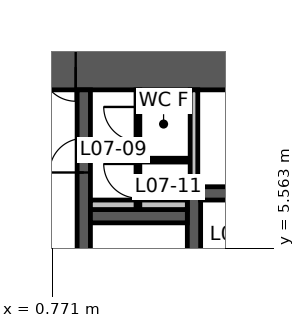
"""IFC4 building model, lengths in metres.
Left out: names, types, materials, properties, quantities, classifications, styles, units other than length and angle.
Written with IfcOpenShell. Run it as: python <this file> out.ifc"""

import sys

from ifc_helpers import new_model, si_unit, direction, frame, frame_2d, origin, place, context, subcontext, project, spatial, polyline, rectangle, outline, extrude, element, fill, save


model = new_model("IFC4")
c1 = context("Model", 3, precision=1e-05, world=origin(), true_north=direction((0.0, 1.0)))
c2 = subcontext(c1, "Body", "Model", "MODEL_VIEW")
j1 = project(units=[si_unit("LENGTHUNIT", "METRE"), si_unit("PLANEANGLEUNIT", "RADIAN")], contexts=[c1])
p1 = place(None, origin())
s1 = spatial("IfcSite", under=j1, at=p1, CompositionType="ELEMENT")
p2 = place(p1, origin())
s2 = spatial("IfcBuilding", under=s1, at=p2, CompositionType="ELEMENT")
p3 = place(p2, frame((0.0, 0.0, 26.8)))
s3 = spatial("IfcBuildingStorey", under=s2, at=p3, CompositionType="ELEMENT", Elevation=26.8)
p4 = place(p3, frame((5.961, 10.325, 0.0), z_axis=(0.0, 0.0, 1.0), x_axis=(-1.0, 0.0, 0.0)))
e1 = element("IfcWall", 1, at=p4, inside=s3, PredefinedType="SHEAR", context=c2, shape_type="SweptSolid", body=[
    extrude(outline(polyline([(-0.346, -0.6), (4.574, -0.6), (5.474, -0.6), (6.449, -0.6), (7.349, -0.6), (12.269, -0.6), (11.576, 0.6), (7.349, 0.6), (6.449, 0.6), (5.474, 0.6), (4.574, 0.6), (0.346, 0.6), (-0.346, -0.6)])), origin(), (0.0, 0.0, 1.0), 4.2),
])
p5 = place(p4, frame((6.449, 0.0, 0.0)))
e2 = element("IfcOpeningElement", 2, at=p5, cuts=e1, PredefinedType="OPENING", context=c2, shape_type="SweptSolid", body=[
    extrude(rectangle(XDim=0.9, YDim=2.1, at=frame_2d((0.45, 1.05))), frame((0.0, 0.61, 0.0), z_axis=(0.0, -1.0, 0.0), x_axis=(1.0, 0.0, 0.0)), (0.0, 0.0, 1.0), 1.22),
])
p6 = place(p4, frame((4.574, 0.0, 0.0)))
e3 = element("IfcOpeningElement", 3, at=p6, cuts=e1, PredefinedType="OPENING", context=c2, shape_type="SweptSolid", body=[
    extrude(rectangle(XDim=0.9, YDim=2.1, at=frame_2d((0.45, 1.05))), frame((0.0, 0.61, 0.0), z_axis=(0.0, -1.0, 0.0), x_axis=(1.0, 0.0, 0.0)), (0.0, 0.0, 1.0), 1.22),
])
p7 = place(p3, frame((1.6, 3.775, 0.0), z_axis=(0.0, 0.0, 1.0), x_axis=(0.0, 1.0, 0.0)))
e4 = element("IfcWall", 4, at=p7, inside=s3, PredefinedType="SHEAR", context=c2, shape_type="SweptSolid", body=[
    extrude(rectangle(XDim=5.95, YDim=0.35, at=frame_2d((2.975, 0.0))), origin(), (0.0, 0.0, 1.0), 4.2),
])
p8 = place(p7, frame((3.775, 0.0, 0.0)))
e5 = element("IfcOpeningElement", 5, at=p8, cuts=e4, PredefinedType="OPENING", context=c2, shape_type="SweptSolid", body=[
    extrude(rectangle(XDim=0.9, YDim=2.1, at=frame_2d((0.45, 1.05))), frame((0.0, 0.185, 0.0), z_axis=(0.0, -1.0, 0.0), x_axis=(1.0, 0.0, 0.0)), (0.0, 0.0, 1.0), 0.37),
])
p9 = place(p3, frame((4.5, 3.775, 0.0), z_axis=(0.0, 0.0, 1.0), x_axis=(0.0, 1.0, 0.0)))
e6 = element("IfcWall", 6, at=p9, inside=s3, PredefinedType="SHEAR", context=c2, shape_type="SweptSolid", body=[
    extrude(rectangle(XDim=3.4, YDim=0.35, at=frame_2d((1.7, 0.0))), origin(), (0.0, 0.0, 1.0), 4.2),
])
p10 = place(p3, frame((1.775, 6.4, 0.0), z_axis=(0.0, 0.0, 1.0), x_axis=(1.0, 0.0, 0.0)))
e7 = element("IfcWall", 7, at=p10, inside=s3, PredefinedType="SHEAR", context=c2, shape_type="SweptSolid", body=[
    extrude(rectangle(XDim=2.55, YDim=0.35, at=frame_2d((1.275, 0.0))), origin(), (0.0, 0.0, 1.0), 4.2),
])
p11 = place(p3, frame((4.675, 7.0, 0.0), z_axis=(0.0, 0.0, 1.0), x_axis=(1.0, 0.0, 0.0)))
e8 = element("IfcWall", 8, at=p11, inside=s3, PredefinedType="SHEAR", context=c2, shape_type="SweptSolid", body=[
    extrude(rectangle(XDim=2.25, YDim=0.35, at=frame_2d((1.125, 0.0))), origin(), (0.0, 0.0, 1.0), 4.2),
])
p12 = place(p3, frame((4.5, 7.175, 0.0), z_axis=(0.0, 0.0, 1.0), x_axis=(0.0, 1.0, 0.0)))
e9 = element("IfcWall", 9, at=p12, inside=s3, PredefinedType="STANDARD", context=c2, shape_type="SweptSolid", body=[
    extrude(rectangle(XDim=2.55, YDim=0.2, at=frame_2d((1.275, 0.0))), origin(), (0.0, 0.0, 1.0), 4.2),
])
p13 = place(p3, frame((1.775, 6.7, 0.0), z_axis=(0.0, 0.0, 1.0), x_axis=(1.0, 0.0, 0.0)))
e10 = element("IfcWall", 10, at=p13, inside=s3, PredefinedType="PLUMBINGWALL", context=c2, shape_type="SweptSolid", body=[
    extrude(rectangle(XDim=2.55, YDim=0.25, at=frame_2d((1.275, 0.0))), origin(), (0.0, 0.0, 1.0), 4.2),
])
p14 = place(p3, frame((3.025, 6.575, 0.0), z_axis=(0.0, 0.0, 1.0), x_axis=(0.0, 1.0, 0.0)))
e11 = element("IfcWall", 11, at=p14, inside=s3, PredefinedType="PARTITIONING", context=c2, shape_type="SweptSolid", body=[
    extrude(rectangle(XDim=3.15, YDim=0.1, at=frame_2d((1.575, 0.0))), origin(), (0.0, 0.0, 1.0), 3.23),
])
p15 = place(p14, frame((1.8, 0.0, 0.0)))
e12 = element("IfcOpeningElement", 12, at=p15, cuts=e11, PredefinedType="OPENING", context=c2, shape_type="SweptSolid", body=[
    extrude(rectangle(XDim=0.9, YDim=2.1, at=frame_2d((0.45, 1.05))), frame((0.0, 0.06, 0.0), z_axis=(0.0, -1.0, 0.0), x_axis=(1.0, 0.0, 0.0)), (0.0, 0.0, 1.0), 0.12),
])
p16 = place(p14, frame((0.3, 0.0, 0.0)))
e13 = element("IfcOpeningElement", 13, at=p16, cuts=e11, PredefinedType="OPENING", context=c2, shape_type="SweptSolid", body=[
    extrude(rectangle(XDim=0.9, YDim=2.1, at=frame_2d((0.45, 1.05))), frame((0.0, 0.06, 0.0), z_axis=(0.0, -1.0, 0.0), x_axis=(1.0, 0.0, 0.0)), (0.0, 0.0, 1.0), 0.12),
])
p17 = place(p3, frame((3.075, 7.875, 0.0), z_axis=(0.0, 0.0, 1.0), x_axis=(1.0, 0.0, 0.0)))
e14 = element("IfcWall", 14, at=p17, inside=s3, PredefinedType="PARTITIONING", context=c2, shape_type="SweptSolid", body=[
    extrude(rectangle(XDim=1.25, YDim=0.1, at=frame_2d((0.625, 0.0))), origin(), (0.0, 0.0, 1.0), 3.23),
])
p18 = place(p6, origin())
e15 = element("IfcDoor", 15, at=p18, inside=s3, OperationType="SINGLE_SWING_LEFT", PredefinedType="DOOR", context=c2, shape_type="SweptSolid", body=[
    extrude(rectangle(XDim=0.9, YDim=2.1, at=frame_2d((0.45, 1.05))), frame((0.0, 0.025, 0.0), z_axis=(0.0, -1.0, 0.0), x_axis=(1.0, 0.0, 0.0)), (0.0, 0.0, 1.0), 0.05),
])
fill(e3, e15)
p19 = place(p8, origin())
e16 = element("IfcDoor", 16, at=p19, inside=s3, OperationType="SINGLE_SWING_LEFT", PredefinedType="DOOR", context=c2, shape_type="SweptSolid", body=[
    extrude(rectangle(XDim=0.9, YDim=2.1, at=frame_2d((0.45, 1.05))), frame((0.0, 0.025, 0.0), z_axis=(0.0, -1.0, 0.0), x_axis=(1.0, 0.0, 0.0)), (0.0, 0.0, 1.0), 0.05),
])
fill(e5, e16)
p20 = place(p15, origin())
e17 = element("IfcDoor", 17, at=p20, inside=s3, OperationType="SINGLE_SWING_RIGHT", PredefinedType="DOOR", context=c2, shape_type="SweptSolid", body=[
    extrude(rectangle(XDim=0.9, YDim=2.1, at=frame_2d((0.45, 1.05))), frame((0.0, 0.025, 0.0), z_axis=(0.0, -1.0, 0.0), x_axis=(1.0, 0.0, 0.0)), (0.0, 0.0, 1.0), 0.05),
])
fill(e12, e17)
p21 = place(p16, origin())
e18 = element("IfcDoor", 18, at=p21, inside=s3, OperationType="SINGLE_SWING_RIGHT", PredefinedType="DOOR", context=c2, shape_type="SweptSolid", body=[
    extrude(rectangle(XDim=0.9, YDim=2.1, at=frame_2d((0.45, 1.05))), frame((0.0, 0.025, 0.0), z_axis=(0.0, -1.0, 0.0), x_axis=(1.0, 0.0, 0.0)), (0.0, 0.0, 1.0), 0.05),
])
fill(e13, e18)
save(model, sys.argv[1])
